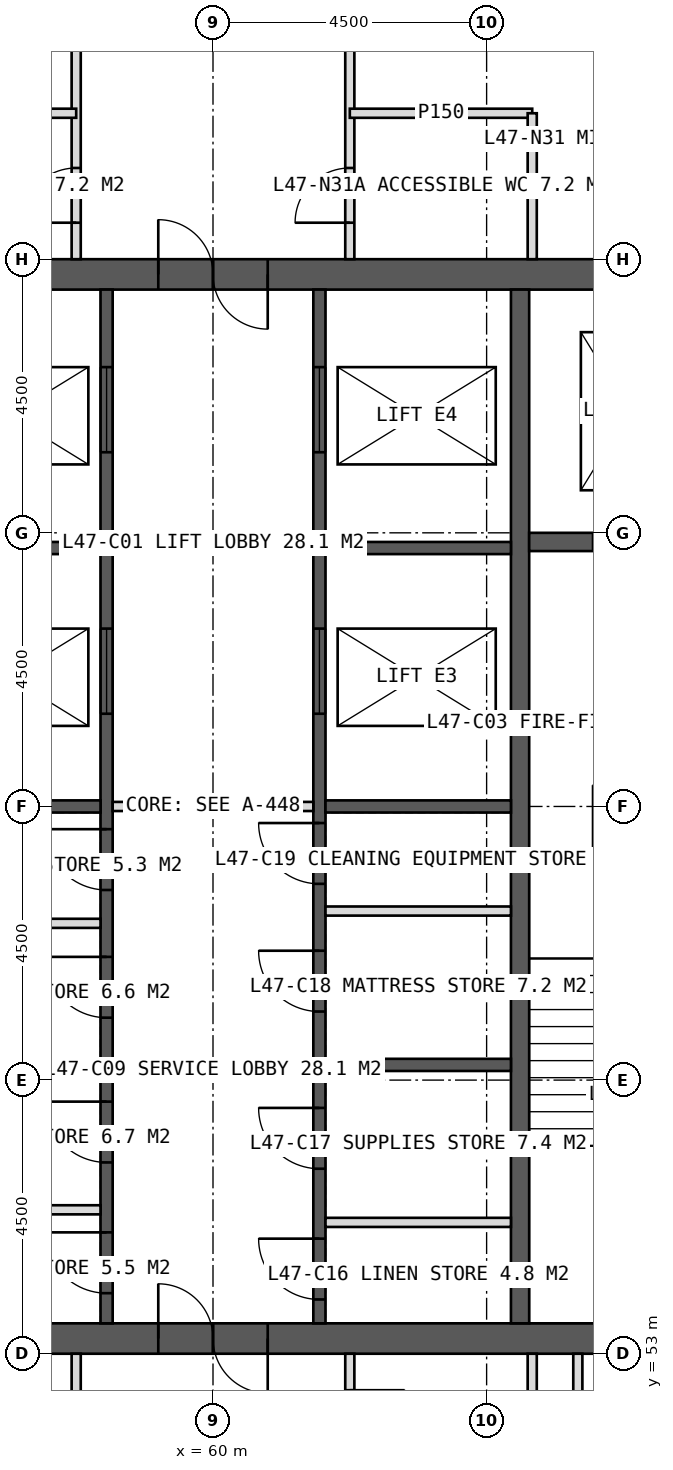
"""IFC4 building model, lengths in metres.
Left out: names, types, materials, properties, quantities, classifications, styles, units other than length and angle.
Written with IfcOpenShell. Run it as: python <this file> out.ifc"""

import sys

from ifc_helpers import new_model, si_unit, direction, frame, frame_2d, origin, place, context, subcontext, project, spatial, rectangle, extrude, element, fill, save


model = new_model("IFC4")
c1 = context("Model", 3, precision=1e-05, world=origin(), true_north=direction((0.0, 1.0)))
c2 = subcontext(c1, "Body", "Model", "MODEL_VIEW")
j1 = project(units=[si_unit("LENGTHUNIT", "METRE"), si_unit("PLANEANGLEUNIT", "RADIAN")], contexts=[c1])
p1 = place(None, origin())
s1 = spatial("IfcSite", under=j1, at=p1, CompositionType="ELEMENT")
p2 = place(p1, origin())
s2 = spatial("IfcBuilding", under=s1, at=p2, CompositionType="ELEMENT")
p3 = place(p2, frame((0.0, 0.0, 197.0)))
s3 = spatial("IfcBuildingStorey", under=s2, at=p3, CompositionType="ELEMENT", Elevation=197.0)
p4 = place(p3, frame((51.0, 70.75, 0.0), z_axis=(0.0, 0.0, 1.0), x_axis=(1.0, 0.0, 0.0)))
e1 = element("IfcWall", 1, at=p4, inside=s3, PredefinedType="SHEAR", context=c2, shape_type="SweptSolid", body=[
    extrude(rectangle(XDim=18.0, YDim=0.5, at=frame_2d((9.0, 0.0))), origin(), (0.0, 0.0, 1.0), 4.0),
])
p5 = place(p4, frame((8.1, 0.0, 0.0)))
e2 = element("IfcOpeningElement", 2, at=p5, cuts=e1, PredefinedType="OPENING", context=c2, shape_type="SweptSolid", body=[
    extrude(rectangle(XDim=1.8, YDim=2.2, at=frame_2d((0.9, 1.1))), frame((0.0, 0.26, 0.0), z_axis=(0.0, -1.0, 0.0), x_axis=(1.0, 0.0, 0.0)), (0.0, 0.0, 1.0), 0.52),
])
p6 = place(p3, frame((51.0, 53.25, 0.0), z_axis=(0.0, 0.0, 1.0), x_axis=(1.0, 0.0, 0.0)))
e3 = element("IfcWall", 3, at=p6, inside=s3, PredefinedType="SHEAR", context=c2, shape_type="SweptSolid", body=[
    extrude(rectangle(XDim=18.0, YDim=0.5, at=frame_2d((9.0, 0.0))), origin(), (0.0, 0.0, 1.0), 4.0),
])
p7 = place(p6, frame((8.1, 0.0, 0.0)))
e4 = element("IfcOpeningElement", 4, at=p7, cuts=e3, PredefinedType="OPENING", context=c2, shape_type="SweptSolid", body=[
    extrude(rectangle(XDim=1.8, YDim=2.2, at=frame_2d((0.9, 1.1))), frame((0.0, 0.26, 0.0), z_axis=(0.0, -1.0, 0.0), x_axis=(1.0, 0.0, 0.0)), (0.0, 0.0, 1.0), 0.52),
])
p8 = place(p3, frame((65.05, 53.5, 0.0), z_axis=(0.0, 0.0, 1.0), x_axis=(0.0, 1.0, 0.0)))
e5 = element("IfcWall", 5, at=p8, inside=s3, PredefinedType="SHEAR", context=c2, shape_type="SweptSolid", body=[
    extrude(rectangle(XDim=17.0, YDim=0.3, at=frame_2d((8.5, 0.0))), origin(), (0.0, 0.0, 1.0), 4.0),
])
p9 = place(p3, frame((58.25, 53.5, 0.0), z_axis=(0.0, 0.0, 1.0), x_axis=(0.0, 1.0, 0.0)))
e6 = element("IfcWall", 6, at=p9, inside=s3, PredefinedType="SHEAR", context=c2, shape_type="SweptSolid", body=[
    extrude(rectangle(XDim=17.0, YDim=0.2, at=frame_2d((8.5, 0.0))), origin(), (0.0, 0.0, 1.0), 4.0),
])
p10 = place(p9, frame((0.496, 0.0, 0.0)))
e7 = element("IfcOpeningElement", 7, at=p10, cuts=e6, PredefinedType="OPENING", context=c2, shape_type="SweptSolid", body=[
    extrude(rectangle(XDim=1.0, YDim=2.1, at=frame_2d((0.5, 1.05))), frame((0.0, 0.11, 0.0), z_axis=(0.0, -1.0, 0.0), x_axis=(1.0, 0.0, 0.0)), (0.0, 0.0, 1.0), 0.22),
])
p11 = place(p9, frame((2.646, 0.0, 0.0)))
e8 = element("IfcOpeningElement", 8, at=p11, cuts=e6, PredefinedType="OPENING", context=c2, shape_type="SweptSolid", body=[
    extrude(rectangle(XDim=1.0, YDim=2.1, at=frame_2d((0.5, 1.05))), frame((0.0, 0.11, 0.0), z_axis=(0.0, -1.0, 0.0), x_axis=(1.0, 0.0, 0.0)), (0.0, 0.0, 1.0), 0.22),
])
p12 = place(p9, frame((5.027, 0.0, 0.0)))
e9 = element("IfcOpeningElement", 9, at=p12, cuts=e6, PredefinedType="OPENING", context=c2, shape_type="SweptSolid", body=[
    extrude(rectangle(XDim=1.0, YDim=2.1, at=frame_2d((0.5, 1.05))), frame((0.0, 0.11, 0.0), z_axis=(0.0, -1.0, 0.0), x_axis=(1.0, 0.0, 0.0)), (0.0, 0.0, 1.0), 0.22),
])
p13 = place(p9, frame((7.126, 0.0, 0.0)))
e10 = element("IfcOpeningElement", 10, at=p13, cuts=e6, PredefinedType="OPENING", context=c2, shape_type="SweptSolid", body=[
    extrude(rectangle(XDim=1.0, YDim=2.1, at=frame_2d((0.5, 1.05))), frame((0.0, 0.11, 0.0), z_axis=(0.0, -1.0, 0.0), x_axis=(1.0, 0.0, 0.0)), (0.0, 0.0, 1.0), 0.22),
])
p14 = place(p9, frame((10.025, 0.0, 0.0)))
e11 = element("IfcOpeningElement", 11, at=p14, cuts=e6, PredefinedType="OPENING", context=c2, shape_type="SweptSolid", body=[
    extrude(rectangle(XDim=1.4, YDim=2.2, at=frame_2d((0.7, 1.1))), frame((0.0, 0.11, 0.0), z_axis=(0.0, -1.0, 0.0), x_axis=(1.0, 0.0, 0.0)), (0.0, 0.0, 1.0), 0.22),
])
p15 = place(p9, frame((14.325, 0.0, 0.0)))
e12 = element("IfcOpeningElement", 12, at=p15, cuts=e6, PredefinedType="OPENING", context=c2, shape_type="SweptSolid", body=[
    extrude(rectangle(XDim=1.4, YDim=2.2, at=frame_2d((0.7, 1.1))), frame((0.0, 0.11, 0.0), z_axis=(0.0, -1.0, 0.0), x_axis=(1.0, 0.0, 0.0)), (0.0, 0.0, 1.0), 0.22),
])
p16 = place(p3, frame((61.75, 53.5, 0.0), z_axis=(0.0, 0.0, 1.0), x_axis=(0.0, 1.0, 0.0)))
e13 = element("IfcWall", 13, at=p16, inside=s3, PredefinedType="SHEAR", context=c2, shape_type="SweptSolid", body=[
    extrude(rectangle(XDim=17.0, YDim=0.2, at=frame_2d((8.5, 0.0))), origin(), (0.0, 0.0, 1.0), 4.0),
])
p17 = place(p16, frame((0.393, 0.0, 0.0)))
e14 = element("IfcOpeningElement", 14, at=p17, cuts=e13, PredefinedType="OPENING", context=c2, shape_type="SweptSolid", body=[
    extrude(rectangle(XDim=1.0, YDim=2.1, at=frame_2d((0.5, 1.05))), frame((0.0, 0.11, 0.0), z_axis=(0.0, -1.0, 0.0), x_axis=(1.0, 0.0, 0.0)), (0.0, 0.0, 1.0), 0.22),
])
p18 = place(p16, frame((2.542, 0.0, 0.0)))
e15 = element("IfcOpeningElement", 15, at=p18, cuts=e13, PredefinedType="OPENING", context=c2, shape_type="SweptSolid", body=[
    extrude(rectangle(XDim=1.0, YDim=2.1, at=frame_2d((0.5, 1.05))), frame((0.0, 0.11, 0.0), z_axis=(0.0, -1.0, 0.0), x_axis=(1.0, 0.0, 0.0)), (0.0, 0.0, 1.0), 0.22),
])
p19 = place(p16, frame((5.127, 0.0, 0.0)))
e16 = element("IfcOpeningElement", 16, at=p19, cuts=e13, PredefinedType="OPENING", context=c2, shape_type="SweptSolid", body=[
    extrude(rectangle(XDim=1.0, YDim=2.1, at=frame_2d((0.5, 1.05))), frame((0.0, 0.11, 0.0), z_axis=(0.0, -1.0, 0.0), x_axis=(1.0, 0.0, 0.0)), (0.0, 0.0, 1.0), 0.22),
])
p20 = place(p16, frame((7.228, 0.0, 0.0)))
e17 = element("IfcOpeningElement", 17, at=p20, cuts=e13, PredefinedType="OPENING", context=c2, shape_type="SweptSolid", body=[
    extrude(rectangle(XDim=1.0, YDim=2.1, at=frame_2d((0.5, 1.05))), frame((0.0, 0.11, 0.0), z_axis=(0.0, -1.0, 0.0), x_axis=(1.0, 0.0, 0.0)), (0.0, 0.0, 1.0), 0.22),
])
p21 = place(p16, frame((10.025, 0.0, 0.0)))
e18 = element("IfcOpeningElement", 18, at=p21, cuts=e13, PredefinedType="OPENING", context=c2, shape_type="SweptSolid", body=[
    extrude(rectangle(XDim=1.4, YDim=2.2, at=frame_2d((0.7, 1.1))), frame((0.0, 0.11, 0.0), z_axis=(0.0, -1.0, 0.0), x_axis=(1.0, 0.0, 0.0)), (0.0, 0.0, 1.0), 0.22),
])
p22 = place(p16, frame((14.325, 0.0, 0.0)))
e19 = element("IfcOpeningElement", 19, at=p22, cuts=e13, PredefinedType="OPENING", context=c2, shape_type="SweptSolid", body=[
    extrude(rectangle(XDim=1.4, YDim=2.2, at=frame_2d((0.7, 1.1))), frame((0.0, 0.11, 0.0), z_axis=(0.0, -1.0, 0.0), x_axis=(1.0, 0.0, 0.0)), (0.0, 0.0, 1.0), 0.22),
])
for number, where, z_axis, x_axis in (
    (20, (55.1, 57.75, 0.0), (0.0, 0.0, 1.0), (1.0, 0.0, 0.0)),
    (21, (61.85, 57.75, 0.0), (0.0, 0.0, 1.0), (1.0, 0.0, 0.0)),
    (22, (55.1, 62.0, 0.0), (0.0, 0.0, 1.0), (1.0, 0.0, 0.0)),
    (23, (61.85, 62.0, 0.0), (0.0, 0.0, 1.0), (1.0, 0.0, 0.0)),
    (24, (55.1, 66.25, 0.0), (0.0, 0.0, 1.0), (1.0, 0.0, 0.0)),
    (25, (61.85, 66.25, 0.0), (0.0, 0.0, 1.0), (1.0, 0.0, 0.0)),
):
    element("IfcWall", number, at=place(p3, frame(where, z_axis=z_axis, x_axis=x_axis)), inside=s3, PredefinedType="SHEAR", context=c2, shape_type="SweptSolid", body=[
        extrude(rectangle(XDim=3.05, YDim=0.2, at=frame_2d((1.525, 0.0))), origin(), (0.0, 0.0, 1.0), 4.0),
    ])
p23 = place(p3, frame((65.2, 61.15, 0.0), z_axis=(0.0, 0.0, 1.0), x_axis=(1.0, 0.0, 0.0)))
e26 = element("IfcWall", 26, at=p23, inside=s3, PredefinedType="SHEAR", context=c2, shape_type="SweptSolid", body=[
    extrude(rectangle(XDim=3.3, YDim=0.3, at=frame_2d((1.65, 0.0))), origin(), (0.0, 0.0, 1.0), 4.0),
])
p24 = place(p23, frame((1.05, 0.0, 0.0)))
e27 = element("IfcOpeningElement", 27, at=p24, cuts=e26, PredefinedType="OPENING", context=c2, shape_type="SweptSolid", body=[
    extrude(rectangle(XDim=1.2, YDim=2.1, at=frame_2d((0.6, 1.05))), frame((0.0, 0.16, 0.0), z_axis=(0.0, -1.0, 0.0), x_axis=(1.0, 0.0, 0.0)), (0.0, 0.0, 1.0), 0.32),
])
p25 = place(p3, frame((65.2, 66.35, 0.0), z_axis=(0.0, 0.0, 1.0), x_axis=(1.0, 0.0, 0.0)))
e28 = element("IfcWall", 28, at=p25, inside=s3, PredefinedType="SHEAR", context=c2, shape_type="SweptSolid", body=[
    extrude(rectangle(XDim=3.3, YDim=0.3, at=frame_2d((1.65, 0.0))), origin(), (0.0, 0.0, 1.0), 4.0),
])
p26 = place(p25, frame((1.05, 0.0, 0.0)))
e29 = element("IfcOpeningElement", 29, at=p26, cuts=e28, PredefinedType="OPENING", context=c2, shape_type="SweptSolid", body=[
    extrude(rectangle(XDim=1.2, YDim=2.2, at=frame_2d((0.6, 1.1))), frame((0.0, 0.16, 0.0), z_axis=(0.0, -1.0, 0.0), x_axis=(1.0, 0.0, 0.0)), (0.0, 0.0, 1.0), 0.32),
])
p27 = place(p3, frame((57.75, 71.0, 0.0), z_axis=(0.0, 0.0, 1.0), x_axis=(0.0, 1.0, 0.0)))
e30 = element("IfcWall", 30, at=p27, inside=s3, PredefinedType="PARTITIONING", context=c2, shape_type="SweptSolid", body=[
    extrude(rectangle(XDim=3.9, YDim=0.15, at=frame_2d((1.95, 0.0))), origin(), (0.0, 0.0, 1.0), 3.75),
])
p28 = place(p27, frame((0.6, 0.0, 0.0)))
e31 = element("IfcOpeningElement", 31, at=p28, cuts=e30, PredefinedType="OPENING", context=c2, shape_type="SweptSolid", body=[
    extrude(rectangle(XDim=0.9, YDim=2.1, at=frame_2d((0.45, 1.05))), frame((0.0, 0.085, 0.0), z_axis=(0.0, -1.0, 0.0), x_axis=(1.0, 0.0, 0.0)), (0.0, 0.0, 1.0), 0.17),
])
p29 = place(p3, frame((62.25, 71.0, 0.0), z_axis=(0.0, 0.0, 1.0), x_axis=(0.0, 1.0, 0.0)))
e32 = element("IfcWall", 32, at=p29, inside=s3, PredefinedType="PARTITIONING", context=c2, shape_type="SweptSolid", body=[
    extrude(rectangle(XDim=3.9, YDim=0.15, at=frame_2d((1.95, 0.0))), origin(), (0.0, 0.0, 1.0), 3.75),
])
p30 = place(p29, frame((0.6, 0.0, 0.0)))
e33 = element("IfcOpeningElement", 33, at=p30, cuts=e32, PredefinedType="OPENING", context=c2, shape_type="SweptSolid", body=[
    extrude(rectangle(XDim=0.9, YDim=2.1, at=frame_2d((0.45, 1.05))), frame((0.0, 0.085, 0.0), z_axis=(0.0, -1.0, 0.0), x_axis=(1.0, 0.0, 0.0)), (0.0, 0.0, 1.0), 0.17),
])
for number, where, z_axis, x_axis in (
    (34, (54.75, 73.4, 0.0), (0.0, 0.0, 1.0), (1.0, 0.0, 0.0)),
    (35, (62.25, 73.4, 0.0), (0.0, 0.0, 1.0), (1.0, 0.0, 0.0)),
):
    element("IfcWall", number, at=place(p3, frame(where, z_axis=z_axis, x_axis=x_axis)), inside=s3, PredefinedType="PARTITIONING", context=c2, shape_type="SweptSolid", body=[
        extrude(rectangle(XDim=3.0, YDim=0.15, at=frame_2d((1.5, 0.0))), origin(), (0.0, 0.0, 1.0), 3.75),
    ])
p31 = place(p3, frame((65.25, 71.0, 0.0), z_axis=(0.0, 0.0, 1.0), x_axis=(0.0, 1.0, 0.0)))
e36 = element("IfcWall", 36, at=p31, inside=s3, PredefinedType="PARTITIONING", context=c2, shape_type="SweptSolid", body=[
    extrude(rectangle(XDim=2.4, YDim=0.15, at=frame_2d((1.2, 0.0))), origin(), (0.0, 0.0, 1.0), 3.75),
])
p32 = place(p3, frame((62.25, 53.0, 0.0), z_axis=(0.0, 0.0, 1.0), x_axis=(0.0, -1.0, 0.0)))
e37 = element("IfcWall", 37, at=p32, inside=s3, PredefinedType="PARTITIONING", context=c2, shape_type="SweptSolid", body=[
    extrude(rectangle(XDim=3.9, YDim=0.15, at=frame_2d((1.95, 0.0))), origin(), (0.0, 0.0, 1.0), 3.75),
])
p33 = place(p32, frame((0.6, 0.0, 0.0)))
e38 = element("IfcOpeningElement", 38, at=p33, cuts=e37, PredefinedType="OPENING", context=c2, shape_type="SweptSolid", body=[
    extrude(rectangle(XDim=0.9, YDim=2.1, at=frame_2d((0.45, 1.05))), frame((0.0, 0.085, 0.0), z_axis=(0.0, -1.0, 0.0), x_axis=(1.0, 0.0, 0.0)), (0.0, 0.0, 1.0), 0.17),
])
for number, where, z_axis, x_axis in (
    (39, (57.75, 53.0, 0.0), (0.0, 0.0, 1.0), (0.0, -1.0, 0.0)),
    (40, (66.0, 53.0, 0.0), (0.0, 0.0, 1.0), (0.0, -1.0, 0.0)),
):
    element("IfcWall", number, at=place(p3, frame(where, z_axis=z_axis, x_axis=x_axis)), inside=s3, PredefinedType="PARTITIONING", context=c2, shape_type="SweptSolid", body=[
        extrude(rectangle(XDim=3.9, YDim=0.15, at=frame_2d((1.95, 0.0))), origin(), (0.0, 0.0, 1.0), 3.75),
    ])
p34 = place(p3, frame((65.25, 53.0, 0.0), z_axis=(0.0, 0.0, 1.0), x_axis=(0.0, -1.0, 0.0)))
e41 = element("IfcWall", 41, at=p34, inside=s3, PredefinedType="PARTITIONING", context=c2, shape_type="SweptSolid", body=[
    extrude(rectangle(XDim=2.4, YDim=0.15, at=frame_2d((1.2, 0.0))), origin(), (0.0, 0.0, 1.0), 3.75),
])
for number, where, z_axis, x_axis in (
    (42, (55.1, 55.367, 0.0), (0.0, 0.0, 1.0), (1.0, 0.0, 0.0)),
    (43, (61.85, 55.16, 0.0), (0.0, 0.0, 1.0), (1.0, 0.0, 0.0)),
    (44, (55.1, 60.078, 0.0), (0.0, 0.0, 1.0), (1.0, 0.0, 0.0)),
    (45, (61.85, 60.28, 0.0), (0.0, 0.0, 1.0), (1.0, 0.0, 0.0)),
):
    element("IfcWall", number, at=place(p3, frame(where, z_axis=z_axis, x_axis=x_axis)), inside=s3, PredefinedType="PARTITIONING", context=c2, shape_type="SweptSolid", body=[
        extrude(rectangle(XDim=3.05, YDim=0.15, at=frame_2d((1.525, 0.0))), origin(), (0.0, 0.0, 1.0), 3.75),
    ])
p35 = place(p3, frame((58.35, 62.0, 0.0), z_axis=(0.0, 0.0, 1.0), x_axis=(1.0, 0.0, 0.0)))
e46 = element("IfcWall", 46, at=p35, inside=s3, PredefinedType="PARTITIONING", context=c2, shape_type="SweptSolid", body=[
    extrude(rectangle(XDim=3.3, YDim=0.15, at=frame_2d((1.65, 0.0))), origin(), (0.0, 0.0, 1.0), 3.75),
])
p36 = place(p28, origin())
e47 = element("IfcDoor", 47, at=p36, inside=s3, OperationType="SINGLE_SWING_LEFT", PredefinedType="DOOR", context=c2, shape_type="SweptSolid", body=[
    extrude(rectangle(XDim=0.9, YDim=2.1, at=frame_2d((0.45, 1.05))), frame((0.0, 0.025, 0.0), z_axis=(0.0, -1.0, 0.0), x_axis=(1.0, 0.0, 0.0)), (0.0, 0.0, 1.0), 0.05),
])
fill(e31, e47)
p37 = place(p30, origin())
e48 = element("IfcDoor", 48, at=p37, inside=s3, OperationType="SINGLE_SWING_LEFT", PredefinedType="DOOR", context=c2, shape_type="SweptSolid", body=[
    extrude(rectangle(XDim=0.9, YDim=2.1, at=frame_2d((0.45, 1.05))), frame((0.0, 0.025, 0.0), z_axis=(0.0, -1.0, 0.0), x_axis=(1.0, 0.0, 0.0)), (0.0, 0.0, 1.0), 0.05),
])
fill(e33, e48)
p38 = place(p5, origin())
e49 = element("IfcDoor", 49, at=p38, inside=s3, OperationType="DOUBLE_DOOR_SINGLE_SWING", PredefinedType="DOOR", context=c2, shape_type="SweptSolid", body=[
    extrude(rectangle(XDim=1.8, YDim=2.2, at=frame_2d((0.9, 1.1))), frame((0.0, 0.025, 0.0), z_axis=(0.0, -1.0, 0.0), x_axis=(1.0, 0.0, 0.0)), (0.0, 0.0, 1.0), 0.05),
])
fill(e2, e49)
p39 = place(p10, origin())
e50 = element("IfcDoor", 50, at=p39, inside=s3, OperationType="SINGLE_SWING_RIGHT", PredefinedType="DOOR", context=c2, shape_type="SweptSolid", body=[
    extrude(rectangle(XDim=1.0, YDim=2.1, at=frame_2d((0.5, 1.05))), frame((0.0, 0.025, 0.0), z_axis=(0.0, -1.0, 0.0), x_axis=(1.0, 0.0, 0.0)), (0.0, 0.0, 1.0), 0.05),
])
fill(e7, e50)
p40 = place(p11, origin())
e51 = element("IfcDoor", 51, at=p40, inside=s3, OperationType="SINGLE_SWING_RIGHT", PredefinedType="DOOR", context=c2, shape_type="SweptSolid", body=[
    extrude(rectangle(XDim=1.0, YDim=2.1, at=frame_2d((0.5, 1.05))), frame((0.0, 0.025, 0.0), z_axis=(0.0, -1.0, 0.0), x_axis=(1.0, 0.0, 0.0)), (0.0, 0.0, 1.0), 0.05),
])
fill(e8, e51)
p41 = place(p17, origin())
e52 = element("IfcDoor", 52, at=p41, inside=s3, OperationType="SINGLE_SWING_RIGHT", PredefinedType="DOOR", context=c2, shape_type="SweptSolid", body=[
    extrude(rectangle(XDim=1.0, YDim=2.1, at=frame_2d((0.5, 1.05))), frame((0.0, 0.025, 0.0), z_axis=(0.0, -1.0, 0.0), x_axis=(1.0, 0.0, 0.0)), (0.0, 0.0, 1.0), 0.05),
])
fill(e14, e52)
p42 = place(p18, origin())
e53 = element("IfcDoor", 53, at=p42, inside=s3, OperationType="SINGLE_SWING_RIGHT", PredefinedType="DOOR", context=c2, shape_type="SweptSolid", body=[
    extrude(rectangle(XDim=1.0, YDim=2.1, at=frame_2d((0.5, 1.05))), frame((0.0, 0.025, 0.0), z_axis=(0.0, -1.0, 0.0), x_axis=(1.0, 0.0, 0.0)), (0.0, 0.0, 1.0), 0.05),
])
fill(e15, e53)
p43 = place(p12, origin())
e54 = element("IfcDoor", 54, at=p43, inside=s3, OperationType="SINGLE_SWING_RIGHT", PredefinedType="DOOR", context=c2, shape_type="SweptSolid", body=[
    extrude(rectangle(XDim=1.0, YDim=2.1, at=frame_2d((0.5, 1.05))), frame((0.0, 0.025, 0.0), z_axis=(0.0, -1.0, 0.0), x_axis=(1.0, 0.0, 0.0)), (0.0, 0.0, 1.0), 0.05),
])
fill(e9, e54)
p44 = place(p13, origin())
e55 = element("IfcDoor", 55, at=p44, inside=s3, OperationType="SINGLE_SWING_RIGHT", PredefinedType="DOOR", context=c2, shape_type="SweptSolid", body=[
    extrude(rectangle(XDim=1.0, YDim=2.1, at=frame_2d((0.5, 1.05))), frame((0.0, 0.025, 0.0), z_axis=(0.0, -1.0, 0.0), x_axis=(1.0, 0.0, 0.0)), (0.0, 0.0, 1.0), 0.05),
])
fill(e10, e55)
p45 = place(p19, origin())
e56 = element("IfcDoor", 56, at=p45, inside=s3, OperationType="SINGLE_SWING_RIGHT", PredefinedType="DOOR", context=c2, shape_type="SweptSolid", body=[
    extrude(rectangle(XDim=1.0, YDim=2.1, at=frame_2d((0.5, 1.05))), frame((0.0, 0.025, 0.0), z_axis=(0.0, -1.0, 0.0), x_axis=(1.0, 0.0, 0.0)), (0.0, 0.0, 1.0), 0.05),
])
fill(e16, e56)
p46 = place(p20, origin())
e57 = element("IfcDoor", 57, at=p46, inside=s3, OperationType="SINGLE_SWING_RIGHT", PredefinedType="DOOR", context=c2, shape_type="SweptSolid", body=[
    extrude(rectangle(XDim=1.0, YDim=2.1, at=frame_2d((0.5, 1.05))), frame((0.0, 0.025, 0.0), z_axis=(0.0, -1.0, 0.0), x_axis=(1.0, 0.0, 0.0)), (0.0, 0.0, 1.0), 0.05),
])
fill(e17, e57)
p47 = place(p14, origin())
e58 = element("IfcDoor", 58, at=p47, inside=s3, OperationType="SLIDING_TO_LEFT", PredefinedType="DOOR", context=c2, shape_type="SweptSolid", body=[
    extrude(rectangle(XDim=1.4, YDim=2.2, at=frame_2d((0.7, 1.1))), frame((0.0, 0.025, 0.0), z_axis=(0.0, -1.0, 0.0), x_axis=(1.0, 0.0, 0.0)), (0.0, 0.0, 1.0), 0.05),
])
fill(e11, e58)
p48 = place(p21, origin())
e59 = element("IfcDoor", 59, at=p48, inside=s3, OperationType="SLIDING_TO_LEFT", PredefinedType="DOOR", context=c2, shape_type="SweptSolid", body=[
    extrude(rectangle(XDim=1.4, YDim=2.2, at=frame_2d((0.7, 1.1))), frame((0.0, 0.025, 0.0), z_axis=(0.0, -1.0, 0.0), x_axis=(1.0, 0.0, 0.0)), (0.0, 0.0, 1.0), 0.05),
])
fill(e18, e59)
p49 = place(p15, origin())
e60 = element("IfcDoor", 60, at=p49, inside=s3, OperationType="SLIDING_TO_LEFT", PredefinedType="DOOR", context=c2, shape_type="SweptSolid", body=[
    extrude(rectangle(XDim=1.4, YDim=2.2, at=frame_2d((0.7, 1.1))), frame((0.0, 0.025, 0.0), z_axis=(0.0, -1.0, 0.0), x_axis=(1.0, 0.0, 0.0)), (0.0, 0.0, 1.0), 0.05),
])
fill(e12, e60)
p50 = place(p22, origin())
e61 = element("IfcDoor", 61, at=p50, inside=s3, OperationType="SLIDING_TO_LEFT", PredefinedType="DOOR", context=c2, shape_type="SweptSolid", body=[
    extrude(rectangle(XDim=1.4, YDim=2.2, at=frame_2d((0.7, 1.1))), frame((0.0, 0.025, 0.0), z_axis=(0.0, -1.0, 0.0), x_axis=(1.0, 0.0, 0.0)), (0.0, 0.0, 1.0), 0.05),
])
fill(e19, e61)
p51 = place(p7, origin())
e62 = element("IfcDoor", 62, at=p51, inside=s3, OperationType="DOUBLE_DOOR_SINGLE_SWING", PredefinedType="DOOR", context=c2, shape_type="SweptSolid", body=[
    extrude(rectangle(XDim=1.8, YDim=2.2, at=frame_2d((0.9, 1.1))), frame((0.0, 0.025, 0.0), z_axis=(0.0, -1.0, 0.0), x_axis=(1.0, 0.0, 0.0)), (0.0, 0.0, 1.0), 0.05),
])
fill(e4, e62)
save(model, sys.argv[1])
